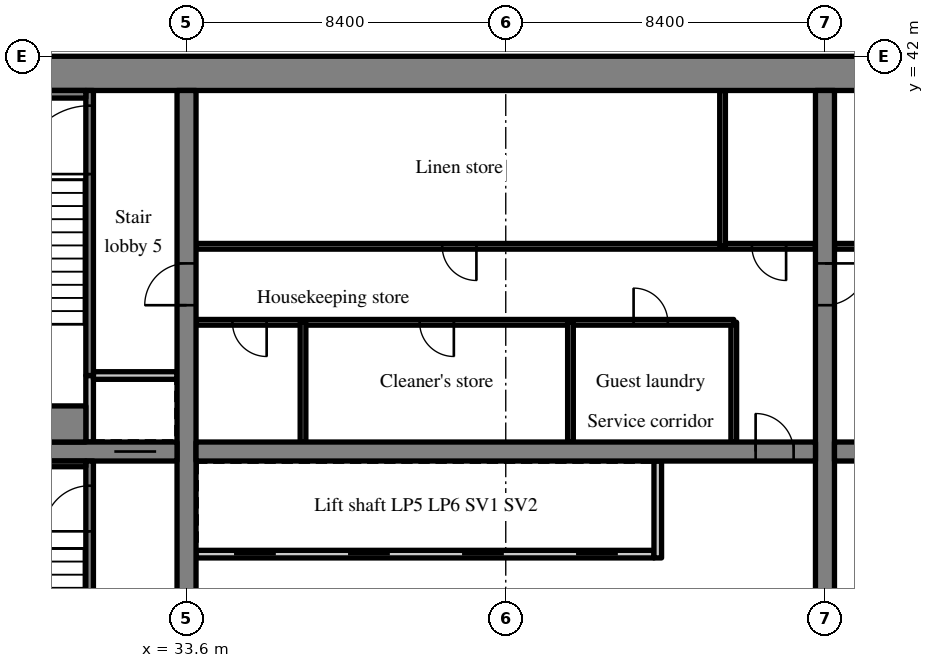
"""IFC4 building model, lengths in metres.
Left out: names, types, materials, properties, quantities, classifications, styles, units other than length and angle.
Written with IfcOpenShell. Run it as: python <this file> out.ifc"""

import sys

from ifc_helpers import new_model, si_unit, direction, frame, frame_2d, origin, place, context, subcontext, project, spatial, rectangle, extrude, source, transform, mapped, element, fill, save


model = new_model("IFC4")
c1 = context("Model", 3, precision=1e-05, world=origin(), true_north=direction((0.0, 1.0)))
c2 = subcontext(c1, "Body", "Model", "MODEL_VIEW")
j1 = project(units=[si_unit("LENGTHUNIT", "METRE"), si_unit("PLANEANGLEUNIT", "RADIAN")], contexts=[c1])
p1 = place(None, origin())
s1 = spatial("IfcSite", under=j1, at=p1, CompositionType="ELEMENT")
p2 = place(p1, origin())
s2 = spatial("IfcBuilding", under=s1, at=p2, CompositionType="ELEMENT")
p3 = place(p2, frame((0.0, 0.0, 118.0)))
s3 = spatial("IfcBuildingStorey", under=s2, at=p3, CompositionType="ELEMENT", Elevation=118.0)
m1 = source(origin(), c2, "Body", "SweptSolid", [
    extrude(rectangle(XDim=50.4, YDim=0.9, at=frame_2d((25.2, 0.0))), origin(), (0.0, 0.0, 1.0), 3.52),
])
p4 = place(p3, frame((25.2, 41.55, 0.0), z_axis=(0.0, 0.0, 1.0), x_axis=(1.0, 0.0, 0.0)))
e1 = element("IfcWall", 1, at=p4, inside=s3, PredefinedType="SHEAR", context=c2, shape_type="MappedRepresentation", body=[
    mapped(m1, transform((0.0, 0.0, 0.0), scale=1.0)),
])
m2 = source(origin(), c2, "Body", "SweptSolid", [
    extrude(rectangle(XDim=18.2, YDim=0.5, at=frame_2d((9.1, 0.0))), origin(), (0.0, 0.0, 1.0), 3.52),
])
p5 = place(p3, frame((33.6, 22.9, 0.0), z_axis=(0.0, 0.0, 1.0), x_axis=(0.0, 1.0, 0.0)))
e2 = element("IfcWall", 2, at=p5, inside=s3, PredefinedType="SHEAR", context=c2, shape_type="MappedRepresentation", body=[
    mapped(m2, transform((0.0, 0.0, 0.0), scale=1.0)),
])
m3 = source(origin(), c2, "Body", "SweptSolid", [
    extrude(rectangle(XDim=1.1, YDim=2.1, at=frame_2d((0.55, 1.05))), frame((0.0, 0.26, 0.0), z_axis=(0.0, -1.0, 0.0), x_axis=(1.0, 0.0, 0.0)), (0.0, 0.0, 1.0), 0.52),
])
p6 = place(p5, frame((12.55, 0.0, 0.0)))
e3 = element("IfcOpeningElement", 3, at=p6, cuts=e2, PredefinedType="OPENING", context=c2, shape_type="MappedRepresentation", body=[
    mapped(m3, transform((0.0, 0.0, 0.0), scale=1.0)),
])
p7 = place(p3, frame((50.4, 22.9, 0.0), z_axis=(0.0, 0.0, 1.0), x_axis=(0.0, 1.0, 0.0)))
e4 = element("IfcWall", 4, at=p7, inside=s3, PredefinedType="SHEAR", context=c2, shape_type="MappedRepresentation", body=[
    mapped(m2, transform((0.0, 0.0, 0.0), scale=1.0)),
])
p8 = place(p7, frame((12.55, 0.0, 0.0)))
e5 = element("IfcOpeningElement", 5, at=p8, cuts=e4, PredefinedType="OPENING", context=c2, shape_type="MappedRepresentation", body=[
    mapped(m3, transform((0.0, 0.0, 0.0), scale=1.0)),
])
m4 = source(origin(), c2, "Body", "SweptSolid", [
    extrude(rectangle(XDim=7.25, YDim=0.5, at=frame_2d((3.625, 0.0))), origin(), (0.0, 0.0, 1.0), 3.52),
])
p9 = place(p3, frame((26.1, 31.6, 0.0), z_axis=(0.0, 0.0, 1.0), x_axis=(1.0, 0.0, 0.0)))
e6 = element("IfcWall", 6, at=p9, inside=s3, PredefinedType="SHEAR", context=c2, shape_type="MappedRepresentation", body=[
    mapped(m4, transform((0.0, 0.0, 0.0), scale=1.0)),
])
p10 = place(p9, frame((5.6, 0.0, 0.0)))
e7 = element("IfcOpeningElement", 7, at=p10, cuts=e6, PredefinedType="OPENING", context=c2, shape_type="MappedRepresentation", body=[
    mapped(m3, transform((0.0, 0.0, 0.0), scale=1.0)),
])
m5 = source(origin(), c2, "Body", "SweptSolid", [
    extrude(rectangle(XDim=16.3, YDim=0.5, at=frame_2d((8.15, 0.0))), origin(), (0.0, 0.0, 1.0), 3.52),
])
p11 = place(p3, frame((33.85, 31.6, 0.0), z_axis=(0.0, 0.0, 1.0), x_axis=(1.0, 0.0, 0.0)))
e8 = element("IfcWall", 8, at=p11, inside=s3, PredefinedType="SHEAR", context=c2, shape_type="MappedRepresentation", body=[
    mapped(m5, transform((0.0, 0.0, 0.0), scale=1.0)),
])
m6 = source(origin(), c2, "Body", "SweptSolid", [
    extrude(rectangle(XDim=1.0, YDim=2.1, at=frame_2d((0.5, 1.05))), frame((0.0, 0.26, 0.0), z_axis=(0.0, -1.0, 0.0), x_axis=(1.0, 0.0, 0.0)), (0.0, 0.0, 1.0), 0.52),
])
p12 = place(p11, frame((14.725, 0.0, 0.0)))
e9 = element("IfcOpeningElement", 9, at=p12, cuts=e8, PredefinedType="OPENING", context=c2, shape_type="MappedRepresentation", body=[
    mapped(m6, transform((0.0, 0.0, 0.0), scale=1.0)),
])
m7 = source(origin(), c2, "Body", "SweptSolid", [
    extrude(rectangle(XDim=16.3, YDim=0.5, at=frame_2d((8.15, 0.0))), origin(), (0.0, 0.0, 1.0), 3.52),
])
p13 = place(p3, frame((50.65, 31.6, 0.0), z_axis=(0.0, 0.0, 1.0), x_axis=(1.0, 0.0, 0.0)))
e10 = element("IfcWall", 10, at=p13, inside=s3, PredefinedType="SHEAR", context=c2, shape_type="MappedRepresentation", body=[
    mapped(m7, transform((0.0, 0.0, 0.0), scale=1.0)),
])
p14 = place(p13, frame((0.575, 0.0, 0.0)))
e11 = element("IfcOpeningElement", 11, at=p14, cuts=e10, PredefinedType="OPENING", context=c2, shape_type="MappedRepresentation", body=[
    mapped(m6, transform((0.0, 0.0, 0.0), scale=1.0)),
])
m8 = source(origin(), c2, "Body", "SweptSolid", [
    extrude(rectangle(XDim=12.05, YDim=0.2, at=frame_2d((6.025, 0.0))), origin(), (0.0, 0.0, 1.0), 3.52),
])
p15 = place(p3, frame((33.85, 28.9, 0.0), z_axis=(0.0, 0.0, 1.0), x_axis=(1.0, 0.0, 0.0)))
e12 = element("IfcWall", 12, at=p15, inside=s3, PredefinedType="SOLIDWALL", context=c2, shape_type="MappedRepresentation", body=[
    mapped(m8, transform((0.0, 0.0, 0.0), scale=1.0)),
])
m9 = source(origin(), c2, "Body", "SweptSolid", [
    extrude(rectangle(XDim=1.1, YDim=2.1, at=frame_2d((0.55, 1.05))), frame((0.0, 0.11, 0.0), z_axis=(0.0, -1.0, 0.0), x_axis=(1.0, 0.0, 0.0)), (0.0, 0.0, 1.0), 0.22),
])
p16 = place(p15, frame((1.0, 0.0, 0.0)))
e13 = element("IfcOpeningElement", 13, at=p16, cuts=e12, PredefinedType="OPENING", context=c2, shape_type="MappedRepresentation", body=[
    mapped(m9, transform((0.0, 0.0, 0.0), scale=1.0)),
])
p17 = place(p15, frame((4.0, 0.0, 0.0)))
e14 = element("IfcOpeningElement", 14, at=p17, cuts=e12, PredefinedType="OPENING", context=c2, shape_type="MappedRepresentation", body=[
    mapped(m9, transform((0.0, 0.0, 0.0), scale=1.0)),
])
p18 = place(p15, frame((7.0, 0.0, 0.0)))
e15 = element("IfcOpeningElement", 15, at=p18, cuts=e12, PredefinedType="OPENING", context=c2, shape_type="MappedRepresentation", body=[
    mapped(m9, transform((0.0, 0.0, 0.0), scale=1.0)),
])
p19 = place(p15, frame((10.0, 0.0, 0.0)))
e16 = element("IfcOpeningElement", 16, at=p19, cuts=e12, PredefinedType="OPENING", context=c2, shape_type="MappedRepresentation", body=[
    mapped(m9, transform((0.0, 0.0, 0.0), scale=1.0)),
])
m10 = source(origin(), c2, "Body", "SweptSolid", [
    extrude(rectangle(XDim=2.55, YDim=0.2, at=frame_2d((1.275, 0.0))), origin(), (0.0, 0.0, 1.0), 3.52),
])
p20 = place(p3, frame((46.0, 28.8, 0.0), z_axis=(0.0, 0.0, 1.0), x_axis=(0.0, 1.0, 0.0)))
e17 = element("IfcWall", 17, at=p20, inside=s3, PredefinedType="SOLIDWALL", context=c2, shape_type="MappedRepresentation", body=[
    mapped(m10, transform((0.0, 0.0, 0.0), scale=1.0)),
])
m11 = source(origin(), c2, "Body", "SweptSolid", [
    extrude(rectangle(XDim=3.15, YDim=0.15, at=frame_2d((1.575, 0.0))), origin(), (0.0, 0.0, 1.0), 3.52),
])
p21 = place(p3, frame((48.0, 31.85, 0.0), z_axis=(0.0, 0.0, 1.0), x_axis=(0.0, 1.0, 0.0)))
e18 = element("IfcWall", 18, at=p21, inside=s3, PredefinedType="PARTITIONING", context=c2, shape_type="MappedRepresentation", body=[
    mapped(m11, transform((0.0, 0.0, 0.0), scale=1.0)),
])
m12 = source(origin(), c2, "Body", "SweptSolid", [
    extrude(rectangle(XDim=14.15, YDim=0.15, at=frame_2d((7.075, 0.0))), origin(), (0.0, 0.0, 1.0), 3.52),
])
p22 = place(p3, frame((33.85, 35.0, 0.0), z_axis=(0.0, 0.0, 1.0), x_axis=(1.0, 0.0, 0.0)))
e19 = element("IfcWall", 19, at=p22, inside=s3, PredefinedType="PARTITIONING", context=c2, shape_type="MappedRepresentation", body=[
    mapped(m12, transform((0.0, 0.0, 0.0), scale=1.0)),
])
m13 = source(origin(), c2, "Body", "SweptSolid", [
    extrude(rectangle(XDim=0.9, YDim=2.1, at=frame_2d((0.45, 1.05))), frame((0.0, 0.085, 0.0), z_axis=(0.0, -1.0, 0.0), x_axis=(1.0, 0.0, 0.0)), (0.0, 0.0, 1.0), 0.17),
])
p23 = place(p22, frame((0.958, 0.0, 0.0)))
e20 = element("IfcOpeningElement", 20, at=p23, cuts=e19, PredefinedType="OPENING", context=c2, shape_type="MappedRepresentation", body=[
    mapped(m13, transform((0.0, 0.0, 0.0), scale=1.0)),
])
p24 = place(p22, frame((5.884, 0.0, 0.0)))
e21 = element("IfcOpeningElement", 21, at=p24, cuts=e19, PredefinedType="OPENING", context=c2, shape_type="MappedRepresentation", body=[
    mapped(m13, transform((0.0, 0.0, 0.0), scale=1.0)),
])
p25 = place(p22, frame((11.514, 0.0, 0.0)))
e22 = element("IfcOpeningElement", 22, at=p25, cuts=e19, PredefinedType="OPENING", context=c2, shape_type="MappedRepresentation", body=[
    mapped(m13, transform((0.0, 0.0, 0.0), scale=1.0)),
])
m14 = source(origin(), c2, "Body", "SweptSolid", [
    extrude(rectangle(XDim=16.3, YDim=0.15, at=frame_2d((8.15, 0.0))), origin(), (0.0, 0.0, 1.0), 3.52),
])
p26 = place(p3, frame((33.85, 37.0, 0.0), z_axis=(0.0, 0.0, 1.0), x_axis=(1.0, 0.0, 0.0)))
e23 = element("IfcWall", 23, at=p26, inside=s3, PredefinedType="PARTITIONING", context=c2, shape_type="MappedRepresentation", body=[
    mapped(m14, transform((0.0, 0.0, 0.0), scale=1.0)),
])
p27 = place(p26, frame((6.478, 0.0, 0.0)))
e24 = element("IfcOpeningElement", 24, at=p27, cuts=e23, PredefinedType="OPENING", context=c2, shape_type="MappedRepresentation", body=[
    mapped(m13, transform((0.0, 0.0, 0.0), scale=1.0)),
])
p28 = place(p26, frame((14.627, 0.0, 0.0)))
e25 = element("IfcOpeningElement", 25, at=p28, cuts=e23, PredefinedType="OPENING", context=c2, shape_type="MappedRepresentation", body=[
    mapped(m13, transform((0.0, 0.0, 0.0), scale=1.0)),
])
for number, where, z_axis, x_axis in (
    (26, (36.665, 31.85, 0.0), (0.0, 0.0, 1.0), (0.0, 1.0, 0.0)),
    (27, (43.703, 31.85, 0.0), (0.0, 0.0, 1.0), (0.0, 1.0, 0.0)),
):
    element("IfcWall", number, at=place(p3, frame(where, z_axis=z_axis, x_axis=x_axis)), inside=s3, PredefinedType="PARTITIONING", context=c2, shape_type="MappedRepresentation", body=[
        mapped(m11, transform((0.0, 0.0, 0.0), scale=1.0)),
    ])
m15 = source(origin(), c2, "Body", "SweptSolid", [
    extrude(rectangle(XDim=4.1, YDim=0.15, at=frame_2d((2.05, 0.0))), origin(), (0.0, 0.0, 1.0), 3.52),
])
p29 = place(p3, frame((47.705, 37.0, 0.0), z_axis=(0.0, 0.0, 1.0), x_axis=(0.0, 1.0, 0.0)))
e28 = element("IfcWall", 28, at=p29, inside=s3, PredefinedType="PARTITIONING", context=c2, shape_type="MappedRepresentation", body=[
    mapped(m15, transform((0.0, 0.0, 0.0), scale=1.0)),
])
m16 = source(origin(), c2, "Body", "SweptSolid", [
    extrude(rectangle(XDim=16.3, YDim=0.15, at=frame_2d((8.15, 0.0))), origin(), (0.0, 0.0, 1.0), 3.52),
])
p30 = place(p3, frame((66.95, 37.0, 0.0), z_axis=(0.0, 0.0, 1.0), x_axis=(-1.0, 0.0, 0.0)))
e29 = element("IfcWall", 29, at=p30, inside=s3, PredefinedType="PARTITIONING", context=c2, shape_type="MappedRepresentation", body=[
    mapped(m16, transform((0.0, 0.0, 0.0), scale=1.0)),
])
p31 = place(p30, frame((1.588, 0.0, 0.0)))
e30 = element("IfcOpeningElement", 30, at=p31, cuts=e29, PredefinedType="OPENING", context=c2, shape_type="MappedRepresentation", body=[
    mapped(m13, transform((0.0, 0.0, 0.0), scale=1.0)),
])
p32 = place(p30, frame((7.293, 0.0, 0.0)))
e31 = element("IfcOpeningElement", 31, at=p32, cuts=e29, PredefinedType="OPENING", context=c2, shape_type="MappedRepresentation", body=[
    mapped(m13, transform((0.0, 0.0, 0.0), scale=1.0)),
])
p33 = place(p30, frame((12.183, 0.0, 0.0)))
e32 = element("IfcOpeningElement", 32, at=p33, cuts=e29, PredefinedType="OPENING", context=c2, shape_type="MappedRepresentation", body=[
    mapped(m13, transform((0.0, 0.0, 0.0), scale=1.0)),
])
p34 = place(p30, frame((14.627, 0.0, 0.0)))
e33 = element("IfcOpeningElement", 33, at=p34, cuts=e29, PredefinedType="OPENING", context=c2, shape_type="MappedRepresentation", body=[
    mapped(m13, transform((0.0, 0.0, 0.0), scale=1.0)),
])
m17 = source(origin(), c2, "Body", "SweptSolid", [
    extrude(rectangle(XDim=8.45, YDim=0.2, at=frame_2d((4.225, 0.0))), origin(), (0.0, 0.0, 1.0), 3.52),
])
p35 = place(p3, frame((31.05, 22.9, 0.0), z_axis=(0.0, 0.0, 1.0), x_axis=(0.0, 1.0, 0.0)))
e34 = element("IfcWall", 34, at=p35, inside=s3, PredefinedType="SOLIDWALL", context=c2, shape_type="MappedRepresentation", body=[
    mapped(m17, transform((0.0, 0.0, 0.0), scale=1.0)),
])
m18 = source(origin(), c2, "Body", "SweptSolid", [
    extrude(rectangle(XDim=1.2, YDim=2.1, at=frame_2d((0.6, 1.05))), frame((0.0, 0.11, 0.0), z_axis=(0.0, -1.0, 0.0), x_axis=(1.0, 0.0, 0.0)), (0.0, 0.0, 1.0), 0.22),
])
p36 = place(p35, frame((6.6, 0.0, 0.0)))
e35 = element("IfcOpeningElement", 35, at=p36, cuts=e34, PredefinedType="OPENING", context=c2, shape_type="MappedRepresentation", body=[
    mapped(m18, transform((0.0, 0.0, 0.0), scale=1.0)),
])
m19 = source(origin(), c2, "Body", "SweptSolid", [
    extrude(rectangle(XDim=1.75, YDim=0.2, at=frame_2d((0.875, 0.0))), origin(), (0.0, 0.0, 1.0), 3.52),
])
p37 = place(p3, frame((31.05, 31.85, 0.0), z_axis=(0.0, 0.0, 1.0), x_axis=(0.0, 1.0, 0.0)))
e36 = element("IfcWall", 36, at=p37, inside=s3, PredefinedType="SOLIDWALL", context=c2, shape_type="MappedRepresentation", body=[
    mapped(m19, transform((0.0, 0.0, 0.0), scale=1.0)),
])
m20 = source(origin(), c2, "Body", "SweptSolid", [
    extrude(rectangle(XDim=2.2, YDim=0.2, at=frame_2d((1.1, 0.0))), origin(), (0.0, 0.0, 1.0), 3.52),
])
p38 = place(p3, frame((31.15, 33.6, 0.0), z_axis=(0.0, 0.0, 1.0), x_axis=(1.0, 0.0, 0.0)))
e37 = element("IfcWall", 37, at=p38, inside=s3, PredefinedType="SOLIDWALL", context=c2, shape_type="MappedRepresentation", body=[
    mapped(m20, transform((0.0, 0.0, 0.0), scale=1.0)),
])
m21 = source(origin(), c2, "Body", "SweptSolid", [
    extrude(rectangle(XDim=7.5, YDim=0.2, at=frame_2d((3.75, 0.0))), origin(), (0.0, 0.0, 1.0), 3.52),
])
p39 = place(p3, frame((31.05, 33.6, 0.0), z_axis=(0.0, 0.0, 1.0), x_axis=(0.0, 1.0, 0.0)))
e38 = element("IfcWall", 38, at=p39, inside=s3, PredefinedType="SOLIDWALL", context=c2, shape_type="MappedRepresentation", body=[
    mapped(m21, transform((0.0, 0.0, 0.0), scale=1.0)),
])
m22 = source(origin(), c2, "Body", "SweptSolid", [
    extrude(rectangle(XDim=1.8, YDim=2.1, at=frame_2d((0.9, 1.05))), frame((0.0, 0.11, 0.0), z_axis=(0.0, -1.0, 0.0), x_axis=(1.0, 0.0, 0.0)), (0.0, 0.0, 1.0), 0.22),
])
p40 = place(p39, frame((5.3, 0.0, 0.0)))
e39 = element("IfcOpeningElement", 39, at=p40, cuts=e38, PredefinedType="OPENING", context=c2, shape_type="MappedRepresentation", body=[
    mapped(m22, transform((0.0, 0.0, 0.0), scale=1.0)),
])
m23 = source(origin(), c2, "Body", "SweptSolid", [
    extrude(rectangle(XDim=4.85, YDim=0.15, at=frame_2d((2.425, 0.0))), origin(), (0.0, 0.0, 1.0), 3.52),
])
p41 = place(p3, frame((26.1, 31.275, 0.0), z_axis=(0.0, 0.0, 1.0), x_axis=(1.0, 0.0, 0.0)))
e40 = element("IfcWall", 40, at=p41, inside=s3, PredefinedType="SOLIDWALL", context=c2, shape_type="MappedRepresentation", body=[
    mapped(m23, transform((0.0, 0.0, 0.0), scale=1.0)),
])
m24 = source(origin(), c2, "Body", "SweptSolid", [
    extrude(rectangle(XDim=4.85, YDim=0.2, at=frame_2d((2.425, 0.0))), origin(), (0.0, 0.0, 1.0), 3.52),
])
p42 = place(p3, frame((26.1, 41.0, 0.0), z_axis=(0.0, 0.0, 1.0), x_axis=(1.0, 0.0, 0.0)))
e41 = element("IfcWall", 41, at=p42, inside=s3, PredefinedType="SOLIDWALL", context=c2, shape_type="MappedRepresentation", body=[
    mapped(m24, transform((0.0, 0.0, 0.0), scale=1.0)),
])
m25 = source(origin(), c2, "Body", "SweptSolid", [
    extrude(rectangle(XDim=4.85, YDim=0.95, at=frame_2d((2.425, 0.0))), origin(), (0.0, 0.0, 1.0), 3.52),
])
p43 = place(p3, frame((26.1, 32.325, 0.0), z_axis=(0.0, 0.0, 1.0), x_axis=(1.0, 0.0, 0.0)))
e42 = element("IfcWall", 42, at=p43, inside=s3, PredefinedType="SOLIDWALL", context=c2, shape_type="MappedRepresentation", body=[
    mapped(m25, transform((0.0, 0.0, 0.0), scale=1.0)),
])
m26 = source(origin(), c2, "Body", "SweptSolid", [
    extrude(rectangle(XDim=1.0, YDim=2.1, at=frame_2d((0.5, 1.05))), frame((0.0, 0.025, 0.0), z_axis=(0.0, -1.0, 0.0), x_axis=(1.0, 0.0, 0.0)), (0.0, 0.0, 1.0), 0.05),
])
p44 = place(p12, origin())
e43 = element("IfcDoor", 43, at=p44, inside=s3, OperationType="SINGLE_SWING_LEFT", PredefinedType="DOOR", context=c2, shape_type="MappedRepresentation", body=[
    mapped(m26, transform((0.0, 0.0, 0.0), scale=1.0)),
])
fill(e9, e43)
m27 = source(origin(), c2, "Body", "SweptSolid", [
    extrude(rectangle(XDim=1.1, YDim=2.1, at=frame_2d((0.55, 1.05))), frame((0.0, 0.025, 0.0), z_axis=(0.0, -1.0, 0.0), x_axis=(1.0, 0.0, 0.0)), (0.0, 0.0, 1.0), 0.05),
])
p45 = place(p16, origin())
e44 = element("IfcDoor", 44, at=p45, inside=s3, OperationType="SLIDING_TO_LEFT", PredefinedType="DOOR", context=c2, shape_type="MappedRepresentation", body=[
    mapped(m27, transform((0.0, 0.0, 0.0), scale=1.0)),
])
fill(e13, e44)
p46 = place(p17, origin())
e45 = element("IfcDoor", 45, at=p46, inside=s3, OperationType="SLIDING_TO_RIGHT", PredefinedType="DOOR", context=c2, shape_type="MappedRepresentation", body=[
    mapped(m27, transform((0.0, 0.0, 0.0), scale=1.0)),
])
fill(e14, e45)
p47 = place(p18, origin())
e46 = element("IfcDoor", 46, at=p47, inside=s3, OperationType="SLIDING_TO_LEFT", PredefinedType="DOOR", context=c2, shape_type="MappedRepresentation", body=[
    mapped(m27, transform((0.0, 0.0, 0.0), scale=1.0)),
])
fill(e15, e46)
p48 = place(p19, origin())
e47 = element("IfcDoor", 47, at=p48, inside=s3, OperationType="SLIDING_TO_RIGHT", PredefinedType="DOOR", context=c2, shape_type="MappedRepresentation", body=[
    mapped(m27, transform((0.0, 0.0, 0.0), scale=1.0)),
])
fill(e16, e47)
m28 = source(origin(), c2, "Body", "SweptSolid", [
    extrude(rectangle(XDim=0.9, YDim=2.1, at=frame_2d((0.45, 1.05))), frame((0.0, 0.025, 0.0), z_axis=(0.0, -1.0, 0.0), x_axis=(1.0, 0.0, 0.0)), (0.0, 0.0, 1.0), 0.05),
])
p49 = place(p23, origin())
e48 = element("IfcDoor", 48, at=p49, inside=s3, OperationType="SINGLE_SWING_RIGHT", PredefinedType="DOOR", context=c2, shape_type="MappedRepresentation", body=[
    mapped(m28, transform((0.0, 0.0, 0.0), scale=1.0)),
])
fill(e20, e48)
p50 = place(p24, origin())
e49 = element("IfcDoor", 49, at=p50, inside=s3, OperationType="SINGLE_SWING_RIGHT", PredefinedType="DOOR", context=c2, shape_type="MappedRepresentation", body=[
    mapped(m28, transform((0.0, 0.0, 0.0), scale=1.0)),
])
fill(e21, e49)
p51 = place(p25, origin())
e50 = element("IfcDoor", 50, at=p51, inside=s3, OperationType="SINGLE_SWING_LEFT", PredefinedType="DOOR", context=c2, shape_type="MappedRepresentation", body=[
    mapped(m28, transform((0.0, 0.0, 0.0), scale=1.0)),
])
fill(e22, e50)
p52 = place(p27, origin())
e51 = element("IfcDoor", 51, at=p52, inside=s3, OperationType="SINGLE_SWING_RIGHT", PredefinedType="DOOR", context=c2, shape_type="MappedRepresentation", body=[
    mapped(m28, transform((0.0, 0.0, 0.0), scale=1.0)),
])
fill(e24, e51)
p53 = place(p28, origin())
e52 = element("IfcDoor", 52, at=p53, inside=s3, OperationType="SINGLE_SWING_RIGHT", PredefinedType="DOOR", context=c2, shape_type="MappedRepresentation", body=[
    mapped(m28, transform((0.0, 0.0, 0.0), scale=1.0)),
])
fill(e25, e52)
m29 = source(origin(), c2, "Body", "SweptSolid", [
    extrude(rectangle(XDim=1.2, YDim=2.1, at=frame_2d((0.6, 1.05))), frame((0.0, 0.025, 0.0), z_axis=(0.0, -1.0, 0.0), x_axis=(1.0, 0.0, 0.0)), (0.0, 0.0, 1.0), 0.05),
])
p54 = place(p36, origin())
e53 = element("IfcDoor", 53, at=p54, inside=s3, OperationType="SINGLE_SWING_LEFT", PredefinedType="DOOR", context=c2, shape_type="MappedRepresentation", body=[
    mapped(m29, transform((0.0, 0.0, 0.0), scale=1.0)),
])
fill(e35, e53)
p55 = place(p10, origin())
e54 = element("IfcDoor", 54, at=p55, inside=s3, OperationType="SLIDING_TO_RIGHT", PredefinedType="DOOR", context=c2, shape_type="MappedRepresentation", body=[
    mapped(m27, transform((0.0, 0.0, 0.0), scale=1.0)),
])
fill(e7, e54)
m30 = source(origin(), c2, "Body", "SweptSolid", [
    extrude(rectangle(XDim=1.8, YDim=2.1, at=frame_2d((0.9, 1.05))), frame((0.0, 0.025, 0.0), z_axis=(0.0, -1.0, 0.0), x_axis=(1.0, 0.0, 0.0)), (0.0, 0.0, 1.0), 0.05),
])
p56 = place(p40, origin())
e55 = element("IfcDoor", 55, at=p56, inside=s3, OperationType="SINGLE_SWING_LEFT", PredefinedType="DOOR", context=c2, shape_type="MappedRepresentation", body=[
    mapped(m30, transform((0.0, 0.0, 0.0), scale=1.0)),
])
fill(e39, e55)
p57 = place(p6, origin())
e56 = element("IfcDoor", 56, at=p57, inside=s3, OperationType="SINGLE_SWING_LEFT", PredefinedType="DOOR", context=c2, shape_type="MappedRepresentation", body=[
    mapped(m27, transform((0.0, 0.0, 0.0), scale=1.0)),
])
fill(e3, e56)
p58 = place(p8, origin())
e57 = element("IfcDoor", 57, at=p58, inside=s3, OperationType="SINGLE_SWING_RIGHT", PredefinedType="DOOR", context=c2, shape_type="MappedRepresentation", body=[
    mapped(m27, transform((0.0, 0.0, 0.0), scale=1.0)),
])
fill(e5, e57)
save(model, sys.argv[1])
